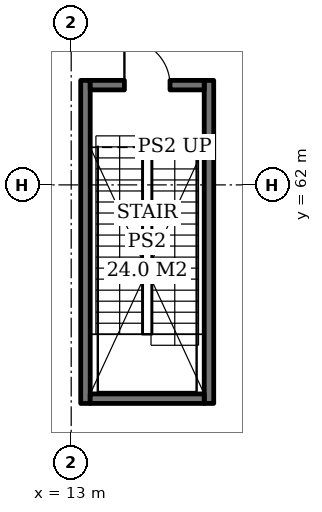
"""IFC4 building model, lengths in metres.
Left out: names, types, materials, properties, quantities, classifications, styles, units other than length and angle.
Written with IfcOpenShell. Run it as: python <this file> out.ifc"""

import sys

from ifc_helpers import new_model, si_unit, direction, frame, frame_2d, origin, place, context, subcontext, project, spatial, rectangle, extrude, element, fill, save


model = new_model("IFC4")
c1 = context("Model", 3, precision=1e-05, world=origin(), true_north=direction((0.0, 1.0)))
c2 = subcontext(c1, "Body", "Model", "MODEL_VIEW")
j1 = project(units=[si_unit("LENGTHUNIT", "METRE"), si_unit("PLANEANGLEUNIT", "RADIAN")], contexts=[c1])
p1 = place(None, origin())
s1 = spatial("IfcSite", under=j1, at=p1, CompositionType="ELEMENT")
p2 = place(p1, origin())
s2 = spatial("IfcBuilding", under=s1, at=p2, CompositionType="ELEMENT")
p3 = place(p2, origin())
s3 = spatial("IfcBuildingStorey", under=s2, at=p3, CompositionType="ELEMENT", Elevation=0.0)
for number, where, z_axis, x_axis in (
    (1, (13.375, 56.25, 0.0), (0.0, 0.0, 1.0), (0.0, 1.0, 0.0)),
    (2, (16.625, 56.25, 0.0), (0.0, 0.0, 1.0), (0.0, 1.0, 0.0)),
):
    element("IfcWall", number, at=place(p3, frame(where, z_axis=z_axis, x_axis=x_axis)), inside=s3, PredefinedType="SOLIDWALL", context=c2, shape_type="SweptSolid", body=[
        extrude(rectangle(XDim=8.5, YDim=0.25, at=frame_2d((4.25, 0.0))), origin(), (0.0, 0.0, 1.0), 5.7),
    ])
p4 = place(p3, frame((13.5, 56.375, 0.0), z_axis=(0.0, 0.0, 1.0), x_axis=(1.0, 0.0, 0.0)))
e3 = element("IfcWall", 3, at=p4, inside=s3, PredefinedType="SOLIDWALL", context=c2, shape_type="SweptSolid", body=[
    extrude(rectangle(XDim=3.0, YDim=0.25, at=frame_2d((1.5, 0.0))), origin(), (0.0, 0.0, 1.0), 5.7),
])
p5 = place(p3, frame((13.5, 64.625, 0.0), z_axis=(0.0, 0.0, 1.0), x_axis=(1.0, 0.0, 0.0)))
e4 = element("IfcWall", 4, at=p5, inside=s3, PredefinedType="SOLIDWALL", context=c2, shape_type="SweptSolid", body=[
    extrude(rectangle(XDim=3.0, YDim=0.25, at=frame_2d((1.5, 0.0))), origin(), (0.0, 0.0, 1.0), 5.7),
])
p6 = place(p5, frame((0.9, 0.0, 0.0)))
e5 = element("IfcOpeningElement", 5, at=p6, cuts=e4, PredefinedType="OPENING", context=c2, shape_type="SweptSolid", body=[
    extrude(rectangle(XDim=1.2, YDim=2.1, at=frame_2d((0.6, 1.05))), frame((0.0, 0.135, 0.0), z_axis=(0.0, -1.0, 0.0), x_axis=(1.0, 0.0, 0.0)), (0.0, 0.0, 1.0), 0.27),
])
p7 = place(p6, origin())
e6 = element("IfcDoor", 6, at=p7, inside=s3, OperationType="SINGLE_SWING_LEFT", PredefinedType="DOOR", context=c2, shape_type="SweptSolid", body=[
    extrude(rectangle(XDim=1.2, YDim=2.1, at=frame_2d((0.6, 1.05))), frame((0.0, 0.025, 0.0), z_axis=(0.0, -1.0, 0.0), x_axis=(1.0, 0.0, 0.0)), (0.0, 0.0, 1.0), 0.05),
])
fill(e5, e6)
save(model, sys.argv[1])
